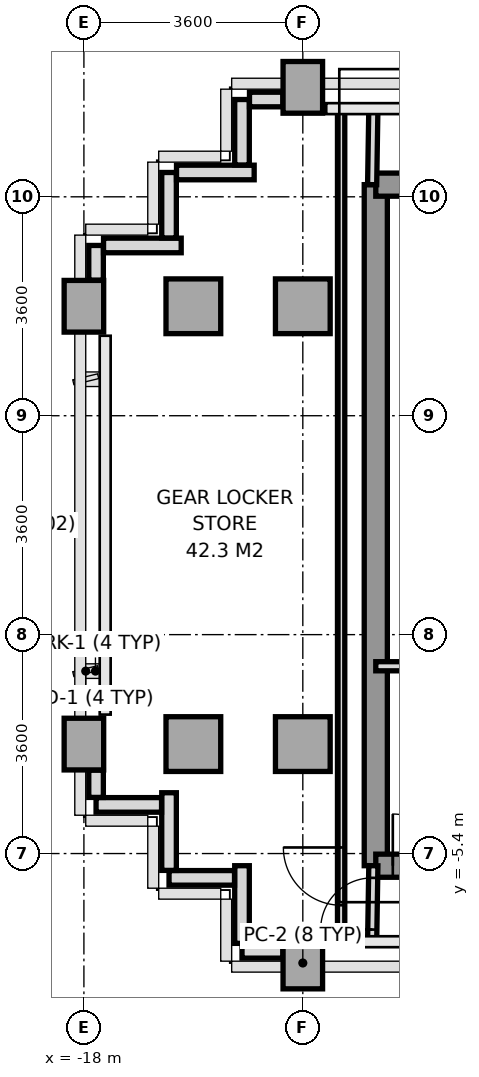
"""IFC4 building model, lengths in metres.
Left out: names, types, materials, properties, quantities, classifications, styles, units other than length and angle.
Written with IfcOpenShell. Run it as: python <this file> out.ifc"""

import sys

from ifc_helpers import new_model, si_unit, direction, frame, frame_2d, origin, origin_2d, place, context, subcontext, project, spatial, rectangle, extrude, source, transform, mapped, element, fill, save


model = new_model("IFC4")
c1 = context("Model", 3, precision=1e-05, world=origin(), true_north=direction((0.0, 1.0)))
c2 = subcontext(c1, "Body", "Model", "MODEL_VIEW")
j1 = project(units=[si_unit("LENGTHUNIT", "METRE"), si_unit("PLANEANGLEUNIT", "RADIAN")], contexts=[c1])
p1 = place(None, origin())
s1 = spatial("IfcSite", under=j1, at=p1, CompositionType="ELEMENT")
p2 = place(p1, origin())
s2 = spatial("IfcBuilding", under=s1, at=p2, CompositionType="ELEMENT")
p3 = place(p2, frame((0.0, 0.0, 163.8)))
s3 = spatial("IfcBuildingStorey", under=s2, at=p3, CompositionType="ELEMENT", Elevation=163.8)
m1 = source(origin(), c2, "Body", "SweptSolid", [
    extrude(rectangle(XDim=0.65, YDim=0.85, at=origin_2d()), origin(), (0.0, 0.0, 1.0), 3.2),
])
for number, where, z_axis, x_axis in (
    (1, (-18.0, -3.6, 0.0), (0.0, 0.0, 1.0), (1.0, 0.0, 0.0)),
    (2, (-18.0, 3.6, 0.0), (0.0, 0.0, 1.0), (1.0, 0.0, 0.0)),
):
    element("IfcColumn", number, at=place(p3, frame(where, z_axis=z_axis, x_axis=x_axis)), inside=s3, PredefinedType="COLUMN", context=c2, shape_type="MappedRepresentation", body=[
        mapped(m1, transform((0.0, 0.0, 0.0), x_axis=(1.0, 0.0, 0.0), y_axis=(0.0, 1.0, 0.0), z_axis=(0.0, 0.0, 1.0), scale=1.0)),
    ])
m2 = source(origin(), c2, "Body", "SweptSolid", [
    extrude(rectangle(XDim=0.9, YDim=0.9, at=origin_2d()), origin(), (0.0, 0.0, 1.0), 3.2),
])
for number, where, z_axis, x_axis in (
    (3, (-16.2, -3.6, 0.0), (0.0, 0.0, 1.0), (1.0, 0.0, 0.0)),
    (4, (-16.2, 3.6, 0.0), (0.0, 0.0, 1.0), (1.0, 0.0, 0.0)),
):
    element("IfcColumn", number, at=place(p3, frame(where, z_axis=z_axis, x_axis=x_axis)), inside=s3, PredefinedType="COLUMN", context=c2, shape_type="MappedRepresentation", body=[
        mapped(m2, transform((0.0, 0.0, 0.0), x_axis=(1.0, 0.0, 0.0), y_axis=(0.0, 1.0, 0.0), z_axis=(0.0, 0.0, 1.0), scale=1.0)),
    ])
p4 = place(p3, frame((-14.4, -7.2, 0.0), z_axis=(0.0, 0.0, 1.0), x_axis=(1.0, 0.0, 0.0)))
e5 = element("IfcColumn", 5, at=p4, inside=s3, PredefinedType="COLUMN", context=c2, shape_type="MappedRepresentation", body=[
    mapped(m1, transform((0.0, 0.0, 0.0), x_axis=(1.0, 0.0, 0.0), y_axis=(0.0, 1.0, 0.0), z_axis=(0.0, 0.0, 1.0), scale=1.0)),
])
for number, where, z_axis, x_axis in (
    (6, (-14.4, -3.6, 0.0), (0.0, 0.0, 1.0), (1.0, 0.0, 0.0)),
    (7, (-14.4, 3.6, 0.0), (0.0, 0.0, 1.0), (1.0, 0.0, 0.0)),
):
    element("IfcColumn", number, at=place(p3, frame(where, z_axis=z_axis, x_axis=x_axis)), inside=s3, PredefinedType="COLUMN", context=c2, shape_type="MappedRepresentation", body=[
        mapped(m2, transform((0.0, 0.0, 0.0), x_axis=(1.0, 0.0, 0.0), y_axis=(0.0, 1.0, 0.0), z_axis=(0.0, 0.0, 1.0), scale=1.0)),
    ])
p5 = place(p3, frame((-14.4, 7.2, 0.0), z_axis=(0.0, 0.0, 1.0), x_axis=(1.0, 0.0, 0.0)))
e8 = element("IfcColumn", 8, at=p5, inside=s3, PredefinedType="COLUMN", context=c2, shape_type="MappedRepresentation", body=[
    mapped(m1, transform((0.0, 0.0, 0.0), x_axis=(1.0, 0.0, 0.0), y_axis=(0.0, 1.0, 0.0), z_axis=(0.0, 0.0, 1.0), scale=1.0)),
])
p6 = place(p3, frame((-14.728, -7.0, 0.0), z_axis=(0.0, 0.0, 1.0), x_axis=(-1.0, 0.0, 0.0)))
e9 = element("IfcWall", 9, at=p6, inside=s3, PredefinedType="PARAPET", context=c2, shape_type="SweptSolid", body=[
    extrude(rectangle(XDim=0.672, YDim=0.24, at=frame_2d((0.336, 0.0))), origin(), (0.0, 0.0, 1.0), 1.15),
])
p7 = place(p3, frame((-15.4, -6.877, 0.0), z_axis=(0.0, 0.0, 1.0), x_axis=(0.0, 1.0, 0.0)))
e10 = element("IfcWall", 10, at=p7, inside=s3, PredefinedType="PARAPET", context=c2, shape_type="SweptSolid", body=[
    extrude(rectangle(XDim=1.277, YDim=0.24, at=frame_2d((0.638, 0.0))), origin(), (0.0, 0.0, 1.0), 1.15),
])
p8 = place(p3, frame((-15.523, -5.8, 0.0), z_axis=(0.0, 0.0, 1.0), x_axis=(-1.0, 0.0, 0.0)))
e11 = element("IfcWall", 11, at=p8, inside=s3, PredefinedType="PARAPET", context=c2, shape_type="SweptSolid", body=[
    extrude(rectangle(XDim=1.077, YDim=0.24, at=frame_2d((0.539, 0.0))), origin(), (0.0, 0.0, 1.0), 1.15),
])
p9 = place(p3, frame((-16.6, -5.677, 0.0), z_axis=(0.0, 0.0, 1.0), x_axis=(0.0, 1.0, 0.0)))
e12 = element("IfcWall", 12, at=p9, inside=s3, PredefinedType="PARAPET", context=c2, shape_type="SweptSolid", body=[
    extrude(rectangle(XDim=1.277, YDim=0.24, at=frame_2d((0.639, 0.0))), origin(), (0.0, 0.0, 1.0), 1.15),
])
p10 = place(p3, frame((-16.723, -4.6, 0.0), z_axis=(0.0, 0.0, 1.0), x_axis=(-1.0, 0.0, 0.0)))
e13 = element("IfcWall", 13, at=p10, inside=s3, PredefinedType="PARAPET", context=c2, shape_type="SweptSolid", body=[
    extrude(rectangle(XDim=1.077, YDim=0.24, at=frame_2d((0.539, 0.0))), origin(), (0.0, 0.0, 1.0), 1.15),
])
p11 = place(p3, frame((-17.8, -4.477, 0.0), z_axis=(0.0, 0.0, 1.0), x_axis=(0.0, 1.0, 0.0)))
e14 = element("IfcWall", 14, at=p11, inside=s3, PredefinedType="PARAPET", context=c2, shape_type="SweptSolid", body=[
    extrude(rectangle(XDim=0.449, YDim=0.24, at=frame_2d((0.225, 0.0))), origin(), (0.0, 0.0, 1.0), 1.15),
])
p12 = place(p3, frame((-17.8, 4.028, 0.0), z_axis=(0.0, 0.0, 1.0), x_axis=(0.0, 1.0, 0.0)))
e15 = element("IfcWall", 15, at=p12, inside=s3, PredefinedType="PARAPET", context=c2, shape_type="SweptSolid", body=[
    extrude(rectangle(XDim=0.572, YDim=0.24, at=frame_2d((0.286, 0.0))), origin(), (0.0, 0.0, 1.0), 1.15),
])
p13 = place(p3, frame((-17.677, 4.6, 0.0), z_axis=(0.0, 0.0, 1.0), x_axis=(1.0, 0.0, 0.0)))
e16 = element("IfcWall", 16, at=p13, inside=s3, PredefinedType="PARAPET", context=c2, shape_type="SweptSolid", body=[
    extrude(rectangle(XDim=1.277, YDim=0.24, at=frame_2d((0.639, 0.0))), origin(), (0.0, 0.0, 1.0), 1.15),
])
p14 = place(p3, frame((-16.6, 4.723, 0.0), z_axis=(0.0, 0.0, 1.0), x_axis=(0.0, 1.0, 0.0)))
e17 = element("IfcWall", 17, at=p14, inside=s3, PredefinedType="PARAPET", context=c2, shape_type="SweptSolid", body=[
    extrude(rectangle(XDim=1.077, YDim=0.24, at=frame_2d((0.539, 0.0))), origin(), (0.0, 0.0, 1.0), 1.15),
])
p15 = place(p3, frame((-16.477, 5.8, 0.0), z_axis=(0.0, 0.0, 1.0), x_axis=(1.0, 0.0, 0.0)))
e18 = element("IfcWall", 18, at=p15, inside=s3, PredefinedType="PARAPET", context=c2, shape_type="SweptSolid", body=[
    extrude(rectangle(XDim=1.277, YDim=0.24, at=frame_2d((0.639, 0.0))), origin(), (0.0, 0.0, 1.0), 1.15),
])
p16 = place(p3, frame((-15.4, 5.923, 0.0), z_axis=(0.0, 0.0, 1.0), x_axis=(0.0, 1.0, 0.0)))
e19 = element("IfcWall", 19, at=p16, inside=s3, PredefinedType="PARAPET", context=c2, shape_type="SweptSolid", body=[
    extrude(rectangle(XDim=1.077, YDim=0.24, at=frame_2d((0.539, 0.0))), origin(), (0.0, 0.0, 1.0), 1.15),
])
p17 = place(p3, frame((-15.277, 7.0, 0.0), z_axis=(0.0, 0.0, 1.0), x_axis=(1.0, 0.0, 0.0)))
e20 = element("IfcWall", 20, at=p17, inside=s3, PredefinedType="PARAPET", context=c2, shape_type="SweptSolid", body=[
    extrude(rectangle(XDim=0.549, YDim=0.24, at=frame_2d((0.274, 0.0))), origin(), (0.0, 0.0, 1.0), 1.15),
])
p18 = place(p3, frame((-13.2, -5.6, 0.0), z_axis=(0.0, 0.0, 1.0), x_axis=(0.0, 1.0, 0.0)))
e21 = element("IfcWall", 21, at=p18, inside=s3, PredefinedType="SHEAR", context=c2, shape_type="SweptSolid", body=[
    extrude(rectangle(XDim=11.2, YDim=0.38, at=frame_2d((5.6, 0.0))), origin(), (0.0, 0.0, 1.0), 3.2),
])
p19 = place(p3, frame((-13.2, 5.6, 0.0), z_axis=(0.0, 0.0, 1.0), x_axis=(1.0, 0.0, 0.0)))
e22 = element("IfcWall", 22, at=p19, inside=s3, PredefinedType="SHEAR", context=c2, shape_type="SweptSolid", body=[
    extrude(rectangle(XDim=1.844, YDim=0.38, at=frame_2d((0.922, 0.0))), origin(), (0.0, 0.0, 1.0), 3.2),
])
p20 = place(p3, frame((-13.2, -5.6, 0.0), z_axis=(0.0, 0.0, 1.0), x_axis=(1.0, 0.0, 0.0)))
e23 = element("IfcWall", 23, at=p20, inside=s3, PredefinedType="SHEAR", context=c2, shape_type="SweptSolid", body=[
    extrude(rectangle(XDim=7.8, YDim=0.38, at=frame_2d((3.9, 0.0))), origin(), (0.0, 0.0, 1.0), 3.2),
])
p21 = place(p20, frame((3.6, 0.0, 0.0)))
e24 = element("IfcOpeningElement", 24, at=p21, cuts=e23, PredefinedType="OPENING", context=c2, shape_type="SweptSolid", body=[
    extrude(rectangle(XDim=1.2, YDim=2.2, at=frame_2d((0.6, 1.1))), frame((0.0, 0.2, 0.0), z_axis=(0.0, -1.0, 0.0), x_axis=(1.0, 0.0, 0.0)), (0.0, 0.0, 1.0), 0.4),
])
p22 = place(p20, frame((0.28, 0.0, 0.0)))
e25 = element("IfcOpeningElement", 25, at=p22, cuts=e23, PredefinedType="OPENING", context=c2, shape_type="SweptSolid", body=[
    extrude(rectangle(XDim=0.85, YDim=2.1, at=frame_2d((0.425, 1.05))), frame((0.0, 0.2, 0.0), z_axis=(0.0, -1.0, 0.0), x_axis=(1.0, 0.0, 0.0)), (0.0, 0.0, 1.0), 0.4),
])
p23 = place(p20, frame((1.36, 0.0, 0.0)))
e26 = element("IfcOpeningElement", 26, at=p23, cuts=e23, PredefinedType="OPENING", context=c2, shape_type="SweptSolid", body=[
    extrude(rectangle(XDim=0.85, YDim=2.1, at=frame_2d((0.425, 1.05))), frame((0.0, 0.2, 0.0), z_axis=(0.0, -1.0, 0.0), x_axis=(1.0, 0.0, 0.0)), (0.0, 0.0, 1.0), 0.4),
])
p24 = place(p3, frame((-13.2, -2.32, 0.0), z_axis=(0.0, 0.0, 1.0), x_axis=(1.0, 0.0, 0.0)))
e27 = element("IfcWall", 27, at=p24, inside=s3, PredefinedType="PARTITIONING", context=c2, shape_type="SweptSolid", body=[
    extrude(rectangle(XDim=2.18, YDim=0.15, at=frame_2d((1.09, 0.0))), origin(), (0.0, 0.0, 1.0), 3.2),
])
p25 = place(p3, frame((-13.26, 5.6, 0.0), z_axis=(0.0, 0.0, 1.0), x_axis=(0.016013571389, 0.999871774545, 0.0)))
e28 = element("IfcWall", 28, at=p25, inside=s3, PredefinedType="PARTITIONING", context=c2, shape_type="SweptSolid", body=[
    extrude(rectangle(XDim=1.25, YDim=0.15, at=frame_2d((0.625, 0.0))), origin(), (0.0, 0.0, 1.0), 3.2),
])
p26 = place(p3, frame((-13.26, -6.85, 0.0), z_axis=(0.0, 0.0, 1.0), x_axis=(0.016013571389, 0.999871774545, 0.0)))
e29 = element("IfcWall", 29, at=p26, inside=s3, PredefinedType="PARTITIONING", context=c2, shape_type="SweptSolid", body=[
    extrude(rectangle(XDim=1.25, YDim=0.15, at=frame_2d((0.625, 0.0))), origin(), (0.0, 0.0, 1.0), 3.2),
])
p27 = place(p26, frame((0.2, 0.0, 0.0)))
e30 = element("IfcOpeningElement", 30, at=p27, cuts=e29, PredefinedType="OPENING", context=c2, shape_type="SweptSolid", body=[
    extrude(rectangle(XDim=0.85, YDim=2.1, at=frame_2d((0.425, 1.05))), frame((0.0, 0.085, 0.0), z_axis=(0.0, -1.0, 0.0), x_axis=(1.0, 0.0, 0.0)), (0.0, 0.0, 1.0), 0.17),
])
p28 = place(p3, frame((-13.77, -6.85, 0.0), z_axis=(0.0, 0.0, 1.0), x_axis=(0.0, 1.0, 0.0)))
e31 = element("IfcWall", 31, at=p28, inside=s3, PredefinedType="PARTITIONING", context=c2, shape_type="SweptSolid", body=[
    extrude(rectangle(XDim=13.7, YDim=0.12, at=frame_2d((6.85, 0.0))), origin(), (0.0, 0.0, 1.0), 2.87),
])
p29 = place(p28, frame((0.6, 0.0, 0.0)))
e32 = element("IfcOpeningElement", 32, at=p29, cuts=e31, PredefinedType="OPENING", context=c2, shape_type="SweptSolid", body=[
    extrude(rectangle(XDim=0.95, YDim=2.15, at=frame_2d((0.475, 1.075))), frame((0.0, 0.07, 0.0), z_axis=(0.0, -1.0, 0.0), x_axis=(1.0, 0.0, 0.0)), (0.0, 0.0, 1.0), 0.14),
])
m3 = source(origin(), c2, "Body", "SweptSolid", [
    extrude(rectangle(XDim=0.85, YDim=2.1, at=frame_2d((0.425, 1.05))), frame((0.0, 0.025, 0.0), z_axis=(0.0, -1.0, 0.0), x_axis=(1.0, 0.0, 0.0)), (0.0, 0.0, 1.0), 0.05),
])
p30 = place(p22, origin())
e33 = element("IfcDoor", 33, at=p30, inside=s3, OperationType="SINGLE_SWING_LEFT", PredefinedType="DOOR", context=c2, shape_type="MappedRepresentation", body=[
    mapped(m3, transform((0.0, 0.0, 0.0), x_axis=(1.0, 0.0, 0.0), y_axis=(0.0, 1.0, 0.0), z_axis=(0.0, 0.0, 1.0), scale=1.0)),
])
fill(e25, e33)
m4 = source(origin(), c2, "Body", "SweptSolid", [
    extrude(rectangle(XDim=0.95, YDim=2.15, at=frame_2d((0.475, 1.075))), frame((0.0, 0.025, 0.0), z_axis=(0.0, -1.0, 0.0), x_axis=(1.0, 0.0, 0.0)), (0.0, 0.0, 1.0), 0.05),
])
p31 = place(p29, origin())
e34 = element("IfcDoor", 34, at=p31, inside=s3, OperationType="SINGLE_SWING_RIGHT", PredefinedType="DOOR", context=c2, shape_type="MappedRepresentation", body=[
    mapped(m4, transform((0.0, 0.0, 0.0), x_axis=(1.0, 0.0, 0.0), y_axis=(0.0, 1.0, 0.0), z_axis=(0.0, 0.0, 1.0), scale=1.0)),
])
fill(e32, e34)
p32 = place(p27, origin())
e35 = element("IfcDoor", 35, at=p32, inside=s3, OperationType="SINGLE_SWING_LEFT", PredefinedType="DOOR", context=c2, shape_type="MappedRepresentation", body=[
    mapped(m3, transform((0.0, 0.0, 0.0), x_axis=(1.0, 0.0, 0.0), y_axis=(0.0, 1.0, 0.0), z_axis=(0.0, 0.0, 1.0), scale=1.0)),
])
fill(e30, e35)
save(model, sys.argv[1])
